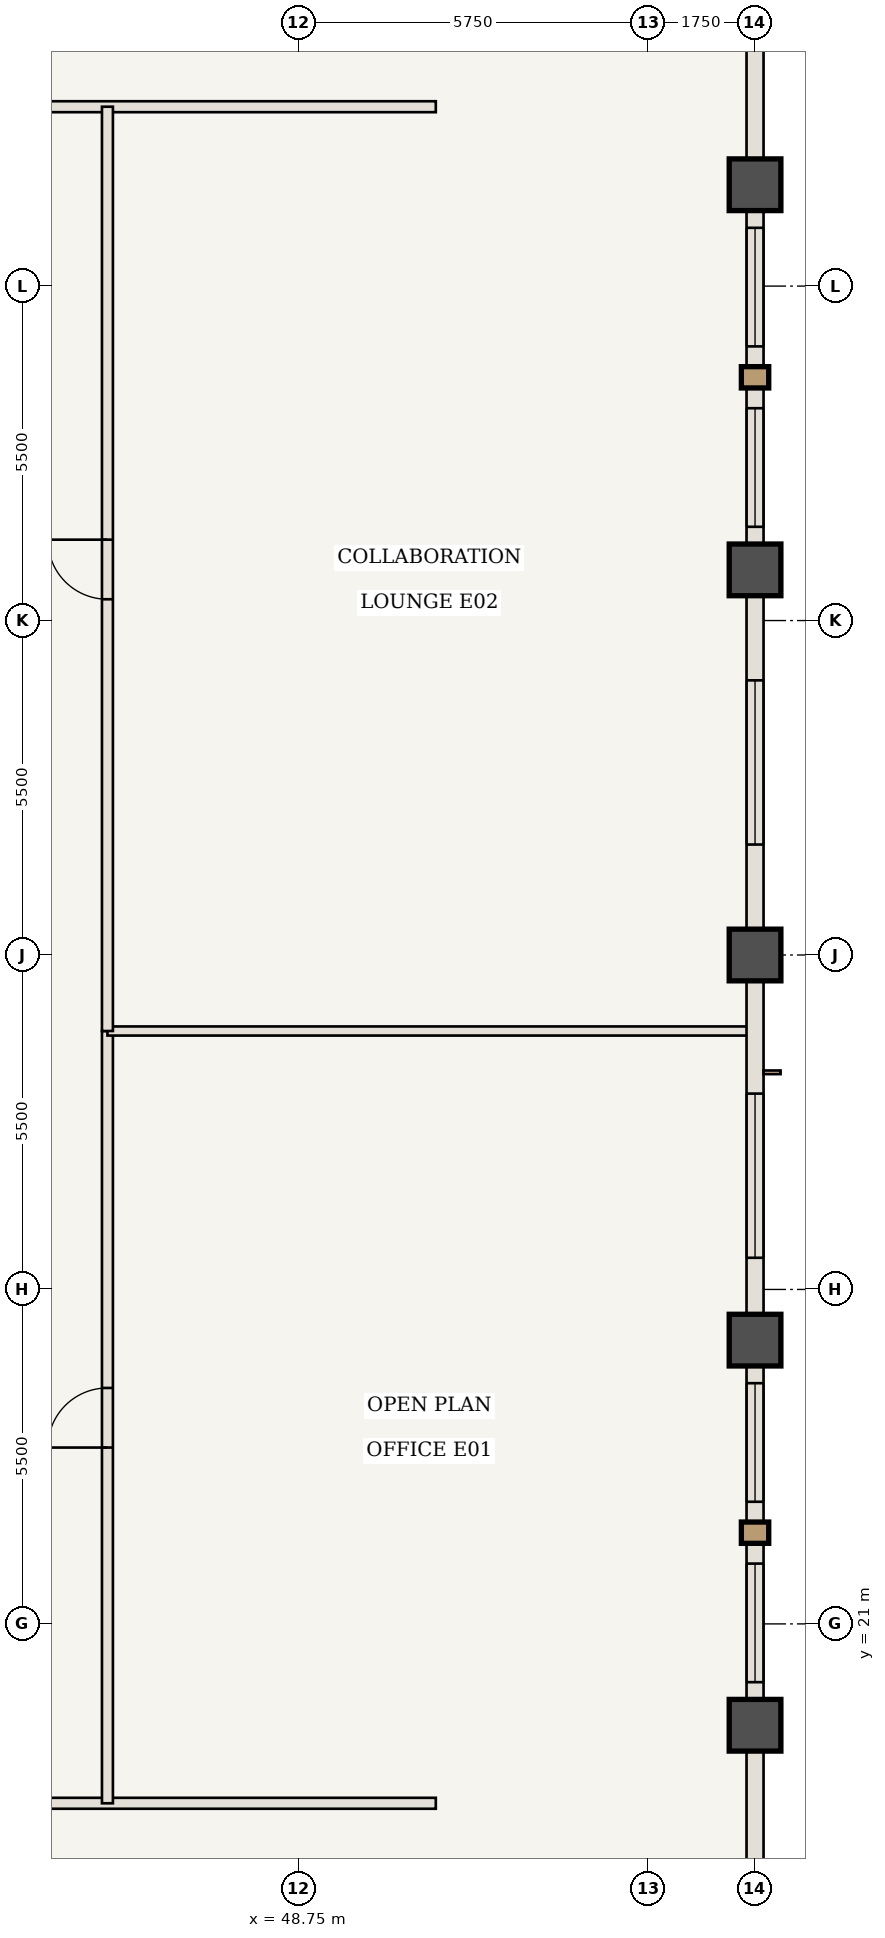
"""IFC4 building model, lengths in metres.
Left out: names, types, materials, properties, quantities, classifications, styles, units other than length and angle.
Written with IfcOpenShell. Run it as: python <this file> out.ifc"""

import sys

from ifc_helpers import new_model, si_unit, direction, frame, frame_2d, origin, origin_2d, place, context, subcontext, project, spatial, rectangle, extrude, element, fill, save


model = new_model("IFC4")
c1 = context("Model", 3, precision=1e-05, world=origin(), true_north=direction((0.0, 1.0)))
c2 = subcontext(c1, "Body", "Model", "MODEL_VIEW")
j1 = project(units=[si_unit("LENGTHUNIT", "METRE"), si_unit("PLANEANGLEUNIT", "RADIAN")], contexts=[c1])
p1 = place(None, origin())
s1 = spatial("IfcSite", under=j1, at=p1, CompositionType="ELEMENT")
p2 = place(p1, origin())
s2 = spatial("IfcBuilding", under=s1, at=p2, CompositionType="ELEMENT")
p3 = place(p2, frame((0.0, 0.0, 206.15)))
s3 = spatial("IfcBuildingStorey", under=s2, at=p3, CompositionType="ELEMENT", Elevation=206.15)
for number, where, z_axis, x_axis in (
    (1, (56.25, 19.333, 0.0), (0.0, 0.0, 1.0), (1.0, 0.0, 0.0)),
    (2, (56.25, 25.667, 0.0), (0.0, 0.0, 1.0), (1.0, 0.0, 0.0)),
    (3, (56.25, 32.0, 0.0), (0.0, 0.0, 1.0), (1.0, 0.0, 0.0)),
    (4, (56.25, 38.333, 0.0), (0.0, 0.0, 1.0), (1.0, 0.0, 0.0)),
    (5, (56.25, 44.667, 0.0), (0.0, 0.0, 1.0), (1.0, 0.0, 0.0)),
):
    element("IfcColumn", number, at=place(p3, frame(where, z_axis=z_axis, x_axis=x_axis)), inside=s3, PredefinedType="COLUMN", context=c2, shape_type="SweptSolid", body=[
        extrude(rectangle(XDim=0.85, YDim=0.85, at=origin_2d()), origin(), (0.0, 0.0, 1.0), 3.85),
    ])
p4 = place(p3, frame((39.208, 18.05, 0.0), z_axis=(0.0, 0.0, 1.0), x_axis=(1.0, 0.0, 0.0)))
e6 = element("IfcWall", 6, at=p4, inside=s3, PredefinedType="STANDARD", context=c2, shape_type="SweptSolid", body=[
    extrude(rectangle(XDim=11.792, YDim=0.18, at=frame_2d((5.896, 0.0))), origin(), (0.0, 0.0, 1.0), 3.685),
])
p5 = place(p4, frame((1.221, 0.0, 0.0)))
e7 = element("IfcOpeningElement", 7, at=p5, cuts=e6, PredefinedType="OPENING", context=c2, shape_type="SweptSolid", body=[
    extrude(rectangle(XDim=0.98, YDim=2.2, at=frame_2d((0.49, 1.1))), frame((0.0, 0.1, 0.0), z_axis=(0.0, -1.0, 0.0), x_axis=(1.0, 0.0, 0.0)), (0.0, 0.0, 1.0), 0.2),
])
p6 = place(p3, frame((39.558, 45.95, 0.0), z_axis=(0.0, 0.0, 1.0), x_axis=(1.0, 0.0, 0.0)))
e8 = element("IfcWall", 8, at=p6, inside=s3, PredefinedType="STANDARD", context=c2, shape_type="SweptSolid", body=[
    extrude(rectangle(XDim=11.442, YDim=0.18, at=frame_2d((5.721, 0.0))), origin(), (0.0, 0.0, 1.0), 3.685),
])
p7 = place(p6, frame((1.046, 0.0, 0.0)))
e9 = element("IfcOpeningElement", 9, at=p7, cuts=e8, PredefinedType="OPENING", context=c2, shape_type="SweptSolid", body=[
    extrude(rectangle(XDim=0.98, YDim=2.2, at=frame_2d((0.49, 1.1))), frame((0.0, 0.1, 0.0), z_axis=(0.0, -1.0, 0.0), x_axis=(1.0, 0.0, 0.0)), (0.0, 0.0, 1.0), 0.2),
])
p8 = place(p3, frame((45.6, 18.05, 0.0), z_axis=(0.0, 0.0, 1.0), x_axis=(0.0, 1.0, 0.0)))
e10 = element("IfcWall", 10, at=p8, inside=s3, PredefinedType="STANDARD", context=c2, shape_type="SweptSolid", body=[
    extrude(rectangle(XDim=12.7, YDim=0.18, at=frame_2d((6.35, 0.0))), origin(), (0.0, 0.0, 1.0), 3.685),
])
p9 = place(p8, frame((5.85, 0.0, 0.0)))
e11 = element("IfcOpeningElement", 11, at=p9, cuts=e10, PredefinedType="OPENING", context=c2, shape_type="SweptSolid", body=[
    extrude(rectangle(XDim=0.98, YDim=2.2, at=frame_2d((0.49, 1.1))), frame((0.0, 0.1, 0.0), z_axis=(0.0, -1.0, 0.0), x_axis=(1.0, 0.0, 0.0)), (0.0, 0.0, 1.0), 0.2),
])
p10 = place(p3, frame((45.6, 30.75, 0.0), z_axis=(0.0, 0.0, 1.0), x_axis=(1.0, 0.0, 0.0)))
e12 = element("IfcWall", 12, at=p10, inside=s3, PredefinedType="STANDARD", context=c2, shape_type="SweptSolid", body=[
    extrude(rectangle(XDim=10.59, YDim=0.15, at=frame_2d((5.295, 0.0))), origin(), (0.0, 0.0, 1.0), 3.685),
])
p11 = place(p3, frame((45.6, 30.75, 0.0), z_axis=(0.0, 0.0, 1.0), x_axis=(0.0, 1.0, 0.0)))
e13 = element("IfcWall", 13, at=p11, inside=s3, PredefinedType="STANDARD", context=c2, shape_type="SweptSolid", body=[
    extrude(rectangle(XDim=15.2, YDim=0.18, at=frame_2d((7.6, 0.0))), origin(), (0.0, 0.0, 1.0), 3.685),
])
p12 = place(p11, frame((7.1, 0.0, 0.0)))
e14 = element("IfcOpeningElement", 14, at=p12, cuts=e13, PredefinedType="OPENING", context=c2, shape_type="SweptSolid", body=[
    extrude(rectangle(XDim=0.98, YDim=2.2, at=frame_2d((0.49, 1.1))), frame((0.0, 0.1, 0.0), z_axis=(0.0, -1.0, 0.0), x_axis=(1.0, 0.0, 0.0)), (0.0, 0.0, 1.0), 0.2),
])
p13 = place(p3, frame((56.25, 19.333, 0.0), z_axis=(0.0, 0.0, 1.0), x_axis=(0.0, -1.0, 0.0)))
e15 = element("IfcWall", 15, at=p13, inside=s3, PredefinedType="USERDEFINED", context=c2, shape_type="SweptSolid", body=[
    extrude(rectangle(XDim=6.333, YDim=0.28, at=frame_2d((3.167, 0.0))), origin(), (0.0, 0.0, 1.0), 2.985),
])
p14 = place(p3, frame((56.25, 25.667, 0.0), z_axis=(0.0, 0.0, 1.0), x_axis=(0.0, -1.0, 0.0)))
e16 = element("IfcWall", 16, at=p14, inside=s3, PredefinedType="USERDEFINED", context=c2, shape_type="SweptSolid", body=[
    extrude(rectangle(XDim=6.333, YDim=0.28, at=frame_2d((3.167, 0.0))), origin(), (0.0, 0.0, 1.0), 2.985),
])
p15 = place(p14, frame((0.708, 0.0, 0.85)))
e17 = element("IfcOpeningElement", 17, at=p15, cuts=e16, PredefinedType="OPENING", context=c2, shape_type="SweptSolid", body=[
    extrude(rectangle(XDim=1.95, YDim=1.935, at=frame_2d((0.975, 0.968))), frame((0.0, 0.15, 0.0), z_axis=(0.0, -1.0, 0.0), x_axis=(1.0, 0.0, 0.0)), (0.0, 0.0, 1.0), 0.3),
])
p16 = place(p14, frame((3.675, 0.0, 0.85)))
e18 = element("IfcOpeningElement", 18, at=p16, cuts=e16, PredefinedType="OPENING", context=c2, shape_type="SweptSolid", body=[
    extrude(rectangle(XDim=1.95, YDim=1.935, at=frame_2d((0.975, 0.968))), frame((0.0, 0.15, 0.0), z_axis=(0.0, -1.0, 0.0), x_axis=(1.0, 0.0, 0.0)), (0.0, 0.0, 1.0), 0.3),
])
p17 = place(p3, frame((56.25, 32.0, 0.0), z_axis=(0.0, 0.0, 1.0), x_axis=(0.0, -1.0, 0.0)))
e19 = element("IfcWall", 19, at=p17, inside=s3, PredefinedType="USERDEFINED", context=c2, shape_type="SweptSolid", body=[
    extrude(rectangle(XDim=6.333, YDim=0.28, at=frame_2d((3.167, 0.0))), origin(), (0.0, 0.0, 1.0), 2.985),
])
p18 = place(p17, frame((2.279, 0.0, 0.85)))
e20 = element("IfcOpeningElement", 20, at=p18, cuts=e19, PredefinedType="OPENING", context=c2, shape_type="SweptSolid", body=[
    extrude(rectangle(XDim=2.7, YDim=1.935, at=frame_2d((1.35, 0.968))), frame((0.0, 0.15, 0.0), z_axis=(0.0, -1.0, 0.0), x_axis=(1.0, 0.0, 0.0)), (0.0, 0.0, 1.0), 0.3),
])
p19 = place(p3, frame((56.25, 38.333, 0.0), z_axis=(0.0, 0.0, 1.0), x_axis=(0.0, -1.0, 0.0)))
e21 = element("IfcWall", 21, at=p19, inside=s3, PredefinedType="USERDEFINED", context=c2, shape_type="SweptSolid", body=[
    extrude(rectangle(XDim=6.333, YDim=0.28, at=frame_2d((3.167, 0.0))), origin(), (0.0, 0.0, 1.0), 2.985),
])
p20 = place(p19, frame((1.817, 0.0, 0.85)))
e22 = element("IfcOpeningElement", 22, at=p20, cuts=e21, PredefinedType="OPENING", context=c2, shape_type="SweptSolid", body=[
    extrude(rectangle(XDim=2.7, YDim=1.935, at=frame_2d((1.35, 0.968))), frame((0.0, 0.15, 0.0), z_axis=(0.0, -1.0, 0.0), x_axis=(1.0, 0.0, 0.0)), (0.0, 0.0, 1.0), 0.3),
])
p21 = place(p3, frame((56.25, 44.667, 0.0), z_axis=(0.0, 0.0, 1.0), x_axis=(0.0, -1.0, 0.0)))
e23 = element("IfcWall", 23, at=p21, inside=s3, PredefinedType="USERDEFINED", context=c2, shape_type="SweptSolid", body=[
    extrude(rectangle(XDim=6.333, YDim=0.28, at=frame_2d((3.167, 0.0))), origin(), (0.0, 0.0, 1.0), 2.985),
])
p22 = place(p21, frame((0.708, 0.0, 0.85)))
e24 = element("IfcOpeningElement", 24, at=p22, cuts=e23, PredefinedType="OPENING", context=c2, shape_type="SweptSolid", body=[
    extrude(rectangle(XDim=1.95, YDim=1.935, at=frame_2d((0.975, 0.968))), frame((0.0, 0.15, 0.0), z_axis=(0.0, -1.0, 0.0), x_axis=(1.0, 0.0, 0.0)), (0.0, 0.0, 1.0), 0.3),
])
p23 = place(p21, frame((3.675, 0.0, 0.85)))
e25 = element("IfcOpeningElement", 25, at=p23, cuts=e23, PredefinedType="OPENING", context=c2, shape_type="SweptSolid", body=[
    extrude(rectangle(XDim=1.95, YDim=1.935, at=frame_2d((0.975, 0.968))), frame((0.0, 0.15, 0.0), z_axis=(0.0, -1.0, 0.0), x_axis=(1.0, 0.0, 0.0)), (0.0, 0.0, 1.0), 0.3),
])
p24 = place(p3, frame((56.25, 51.0, 0.0), z_axis=(0.0, 0.0, 1.0), x_axis=(0.0, -1.0, 0.0)))
e26 = element("IfcWall", 26, at=p24, inside=s3, PredefinedType="USERDEFINED", context=c2, shape_type="SweptSolid", body=[
    extrude(rectangle(XDim=6.333, YDim=0.28, at=frame_2d((3.167, 0.0))), origin(), (0.0, 0.0, 1.0), 2.985),
])
p25 = place(p9, origin())
e27 = element("IfcDoor", 27, at=p25, inside=s3, OperationType="SINGLE_SWING_LEFT", PredefinedType="DOOR", context=c2, shape_type="SweptSolid", body=[
    extrude(rectangle(XDim=0.98, YDim=2.2, at=frame_2d((0.49, 1.1))), frame((0.0, 0.025, 0.0), z_axis=(0.0, -1.0, 0.0), x_axis=(1.0, 0.0, 0.0)), (0.0, 0.0, 1.0), 0.05),
])
fill(e11, e27)
p26 = place(p12, origin())
e28 = element("IfcDoor", 28, at=p26, inside=s3, OperationType="SINGLE_SWING_RIGHT", PredefinedType="DOOR", context=c2, shape_type="SweptSolid", body=[
    extrude(rectangle(XDim=0.98, YDim=2.2, at=frame_2d((0.49, 1.1))), frame((0.0, 0.025, 0.0), z_axis=(0.0, -1.0, 0.0), x_axis=(1.0, 0.0, 0.0)), (0.0, 0.0, 1.0), 0.05),
])
fill(e14, e28)
p27 = place(p15, origin())
e29 = element("IfcWindow", 29, at=p27, inside=s3, PartitioningType="SINGLE_PANEL", PredefinedType="WINDOW", context=c2, shape_type="SweptSolid", body=[
    extrude(rectangle(XDim=1.95, YDim=1.935, at=frame_2d((0.975, 0.968))), frame((0.0, 0.03, 0.0), z_axis=(0.0, -1.0, 0.0), x_axis=(1.0, 0.0, 0.0)), (0.0, 0.0, 1.0), 0.06),
])
fill(e17, e29)
p28 = place(p16, origin())
e30 = element("IfcWindow", 30, at=p28, inside=s3, PartitioningType="SINGLE_PANEL", PredefinedType="WINDOW", context=c2, shape_type="SweptSolid", body=[
    extrude(rectangle(XDim=1.95, YDim=1.935, at=frame_2d((0.975, 0.968))), frame((0.0, 0.03, 0.0), z_axis=(0.0, -1.0, 0.0), x_axis=(1.0, 0.0, 0.0)), (0.0, 0.0, 1.0), 0.06),
])
fill(e18, e30)
p29 = place(p18, origin())
e31 = element("IfcWindow", 31, at=p29, inside=s3, PartitioningType="SINGLE_PANEL", PredefinedType="WINDOW", context=c2, shape_type="SweptSolid", body=[
    extrude(rectangle(XDim=2.7, YDim=1.935, at=frame_2d((1.35, 0.968))), frame((0.0, 0.03, 0.0), z_axis=(0.0, -1.0, 0.0), x_axis=(1.0, 0.0, 0.0)), (0.0, 0.0, 1.0), 0.06),
])
fill(e20, e31)
p30 = place(p20, origin())
e32 = element("IfcWindow", 32, at=p30, inside=s3, PartitioningType="SINGLE_PANEL", PredefinedType="WINDOW", context=c2, shape_type="SweptSolid", body=[
    extrude(rectangle(XDim=2.7, YDim=1.935, at=frame_2d((1.35, 0.968))), frame((0.0, 0.03, 0.0), z_axis=(0.0, -1.0, 0.0), x_axis=(1.0, 0.0, 0.0)), (0.0, 0.0, 1.0), 0.06),
])
fill(e22, e32)
p31 = place(p22, origin())
e33 = element("IfcWindow", 33, at=p31, inside=s3, PartitioningType="SINGLE_PANEL", PredefinedType="WINDOW", context=c2, shape_type="SweptSolid", body=[
    extrude(rectangle(XDim=1.95, YDim=1.935, at=frame_2d((0.975, 0.968))), frame((0.0, 0.03, 0.0), z_axis=(0.0, -1.0, 0.0), x_axis=(1.0, 0.0, 0.0)), (0.0, 0.0, 1.0), 0.06),
])
fill(e24, e33)
p32 = place(p23, origin())
e34 = element("IfcWindow", 34, at=p32, inside=s3, PartitioningType="SINGLE_PANEL", PredefinedType="WINDOW", context=c2, shape_type="SweptSolid", body=[
    extrude(rectangle(XDim=1.95, YDim=1.935, at=frame_2d((0.975, 0.968))), frame((0.0, 0.03, 0.0), z_axis=(0.0, -1.0, 0.0), x_axis=(1.0, 0.0, 0.0)), (0.0, 0.0, 1.0), 0.06),
])
fill(e25, e34)
save(model, sys.argv[1])
